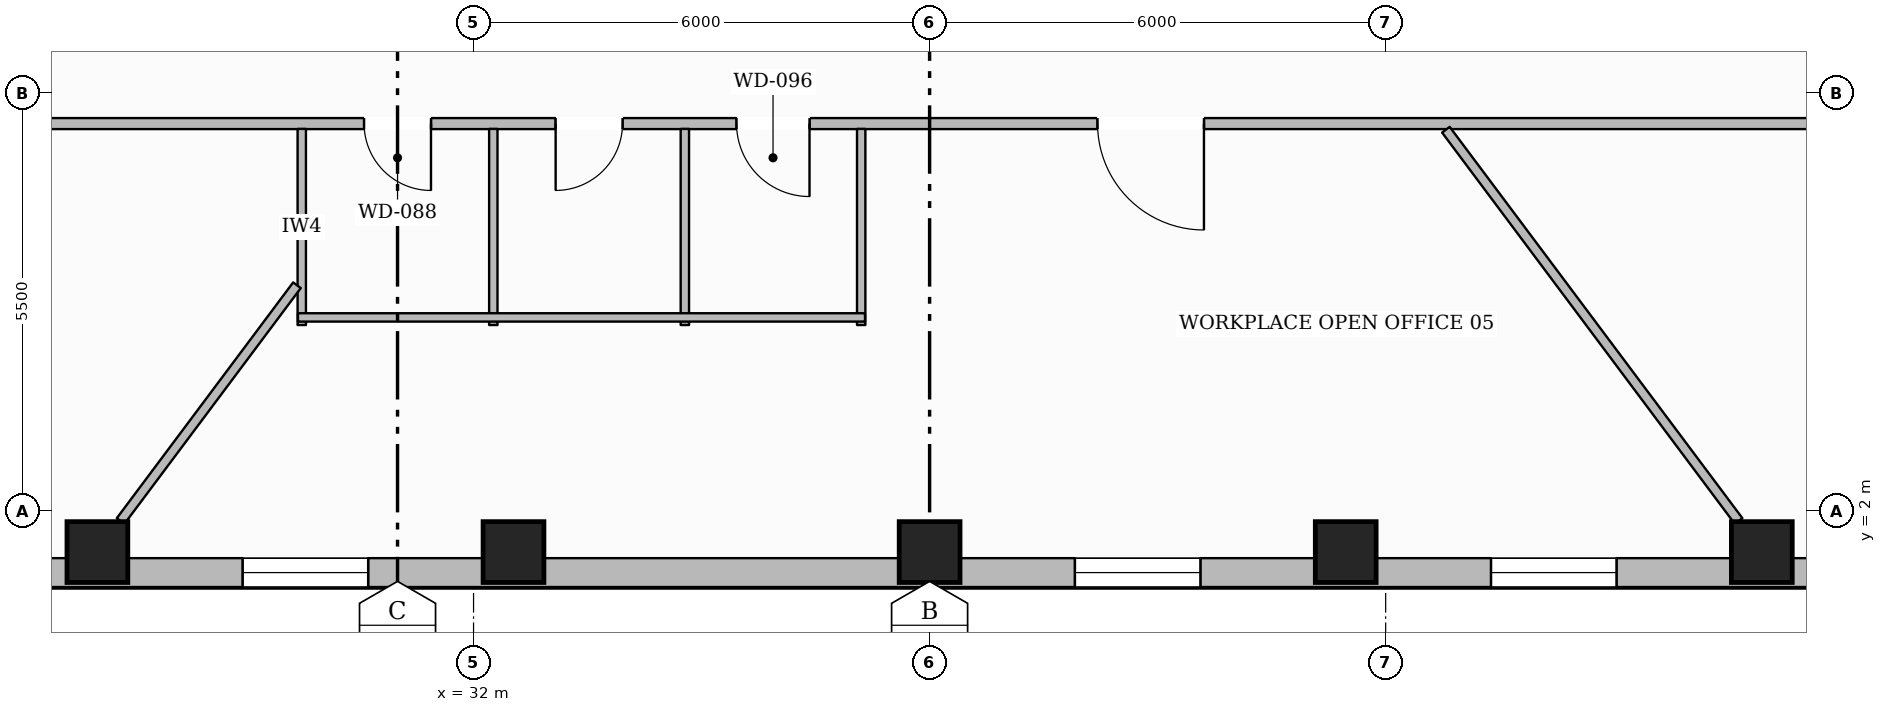
"""IFC4 building model, lengths in metres.
Left out: names, types, materials, properties, quantities, classifications, styles, units other than length and angle.
Written with IfcOpenShell. Run it as: python <this file> out.ifc"""

import sys

from ifc_helpers import new_model, si_unit, direction, frame, frame_2d, origin, origin_2d, place, context, subcontext, project, spatial, rectangle, hollow_rectangle, extrude, element, fill, save


model = new_model("IFC4")
c1 = context("Model", 3, precision=1e-05, world=origin(), true_north=direction((0.0, 1.0)))
c2 = subcontext(c1, "Body", "Model", "MODEL_VIEW")
j1 = project(units=[si_unit("LENGTHUNIT", "METRE"), si_unit("PLANEANGLEUNIT", "RADIAN")], contexts=[c1])
p1 = place(None, origin())
s1 = spatial("IfcSite", under=j1, at=p1, CompositionType="ELEMENT")
p2 = place(p1, origin())
s2 = spatial("IfcBuilding", under=s1, at=p2, CompositionType="ELEMENT")
p3 = place(p2, frame((0.0, 0.0, 21.4)))
s3 = spatial("IfcBuildingStorey", under=s2, at=p3, CompositionType="ELEMENT", Elevation=21.4)
for number, where, z_axis, x_axis in (
    (1, (27.051, 1.463, 0.0), (0.0, 0.0, 1.0), (1.0, 0.0, 0.0)),
    (2, (32.526, 1.463, 0.0), (0.0, 0.0, 1.0), (1.0, 0.0, 0.0)),
    (3, (38.0, 1.463, 0.0), (0.0, 0.0, 1.0), (1.0, 0.0, 0.0)),
    (4, (43.474, 1.463, 0.0), (0.0, 0.0, 1.0), (1.0, 0.0, 0.0)),
    (5, (48.949, 1.463, 0.0), (0.0, 0.0, 1.0), (1.0, 0.0, 0.0)),
):
    element("IfcColumn", number, at=place(p3, frame(where, z_axis=z_axis, x_axis=x_axis)), inside=s3, PredefinedType="COLUMN", context=c2, shape_type="SweptSolid", body=[
        extrude(hollow_rectangle(XDim=0.8, YDim=0.8, WallThickness=0.036, at=origin_2d()), origin(), (0.0, 0.0, 1.0), 3.59),
    ])
p4 = place(p3, frame((54.902, 1.193, 0.0), z_axis=(0.0, 0.0, 1.0), x_axis=(-1.0, 0.0, 0.0)))
e6 = element("IfcWall", 6, at=p4, inside=s3, PredefinedType="STANDARD", context=c2, shape_type="SweptSolid", body=[
    extrude(rectangle(XDim=33.804, YDim=0.38, at=frame_2d((16.902, 0.0))), origin(), (0.0, 0.0, 1.0), 2.97),
])
p5 = place(p4, frame((29.763, 0.0, 0.65)))
e7 = element("IfcOpeningElement", 7, at=p5, cuts=e6, PredefinedType="OPENING", context=c2, shape_type="SweptSolid", body=[
    extrude(rectangle(XDim=1.65, YDim=1.75, at=frame_2d((0.825, 0.875))), frame((0.0, 0.2, 0.0), z_axis=(0.0, -1.0, 0.0), x_axis=(1.0, 0.0, 0.0)), (0.0, 0.0, 1.0), 0.4),
])
p6 = place(p4, frame((24.288, 0.0, 0.65)))
e8 = element("IfcOpeningElement", 8, at=p6, cuts=e6, PredefinedType="OPENING", context=c2, shape_type="SweptSolid", body=[
    extrude(rectangle(XDim=1.65, YDim=1.75, at=frame_2d((0.825, 0.875))), frame((0.0, 0.2, 0.0), z_axis=(0.0, -1.0, 0.0), x_axis=(1.0, 0.0, 0.0)), (0.0, 0.0, 1.0), 0.4),
])
p7 = place(p4, frame((13.34, 0.0, 0.65)))
e9 = element("IfcOpeningElement", 9, at=p7, cuts=e6, PredefinedType="OPENING", context=c2, shape_type="SweptSolid", body=[
    extrude(rectangle(XDim=1.65, YDim=1.75, at=frame_2d((0.825, 0.875))), frame((0.0, 0.2, 0.0), z_axis=(0.0, -1.0, 0.0), x_axis=(1.0, 0.0, 0.0)), (0.0, 0.0, 1.0), 0.4),
])
p8 = place(p4, frame((7.865, 0.0, 0.65)))
e10 = element("IfcOpeningElement", 10, at=p8, cuts=e6, PredefinedType="OPENING", context=c2, shape_type="SweptSolid", body=[
    extrude(rectangle(XDim=1.65, YDim=1.75, at=frame_2d((0.825, 0.875))), frame((0.0, 0.2, 0.0), z_axis=(0.0, -1.0, 0.0), x_axis=(1.0, 0.0, 0.0)), (0.0, 0.0, 1.0), 0.4),
])
p9 = place(p4, frame((2.391, 0.0, 0.65)))
e11 = element("IfcOpeningElement", 11, at=p9, cuts=e6, PredefinedType="OPENING", context=c2, shape_type="SweptSolid", body=[
    extrude(rectangle(XDim=1.65, YDim=1.75, at=frame_2d((0.825, 0.875))), frame((0.0, 0.2, 0.0), z_axis=(0.0, -1.0, 0.0), x_axis=(1.0, 0.0, 0.0)), (0.0, 0.0, 1.0), 0.4),
])
p10 = place(p3, frame((49.92, 7.1, 0.0), z_axis=(0.0, 0.0, 1.0), x_axis=(-1.0, 0.0, 0.0)))
e12 = element("IfcWall", 12, at=p10, inside=s3, PredefinedType="PARTITIONING", context=c2, shape_type="SweptSolid", body=[
    extrude(rectangle(XDim=23.84, YDim=0.145, at=frame_2d((11.92, 0.0))), origin(), (0.0, 0.0, 1.0), 3.278),
])
p11 = place(p10, frame((18.48, 0.0, 0.0)))
e13 = element("IfcOpeningElement", 13, at=p11, cuts=e12, PredefinedType="OPENING", context=c2, shape_type="SweptSolid", body=[
    extrude(rectangle(XDim=0.88, YDim=2.1, at=frame_2d((0.44, 1.05))), frame((0.0, 0.083, 0.0), z_axis=(0.0, -1.0, 0.0), x_axis=(1.0, 0.0, 0.0)), (0.0, 0.0, 1.0), 0.165),
])
p12 = place(p10, frame((15.96, 0.0, 0.0)))
e14 = element("IfcOpeningElement", 14, at=p12, cuts=e12, PredefinedType="OPENING", context=c2, shape_type="SweptSolid", body=[
    extrude(rectangle(XDim=0.88, YDim=2.1, at=frame_2d((0.44, 1.05))), frame((0.0, 0.083, 0.0), z_axis=(0.0, -1.0, 0.0), x_axis=(1.0, 0.0, 0.0)), (0.0, 0.0, 1.0), 0.165),
])
p13 = place(p10, frame((13.5, 0.0, 0.0)))
e15 = element("IfcOpeningElement", 15, at=p13, cuts=e12, PredefinedType="OPENING", context=c2, shape_type="SweptSolid", body=[
    extrude(rectangle(XDim=0.96, YDim=2.1, at=frame_2d((0.48, 1.05))), frame((0.0, 0.083, 0.0), z_axis=(0.0, -1.0, 0.0), x_axis=(1.0, 0.0, 0.0)), (0.0, 0.0, 1.0), 0.165),
])
p14 = place(p10, frame((8.311, 0.0, 0.0)))
e16 = element("IfcOpeningElement", 16, at=p14, cuts=e12, PredefinedType="OPENING", context=c2, shape_type="SweptSolid", body=[
    extrude(rectangle(XDim=1.4, YDim=2.2, at=frame_2d((0.7, 1.1))), frame((0.0, 0.083, 0.0), z_axis=(0.0, -1.0, 0.0), x_axis=(1.0, 0.0, 0.0)), (0.0, 0.0, 1.0), 0.165),
])
for number, where, z_axis, x_axis in (
    (17, (29.74, 4.45, 0.0), (0.0, 0.0, 1.0), (0.0, 1.0, 0.0)),
    (18, (32.26, 4.45, 0.0), (0.0, 0.0, 1.0), (0.0, 1.0, 0.0)),
    (19, (34.78, 4.45, 0.0), (0.0, 0.0, 1.0), (0.0, 1.0, 0.0)),
    (20, (37.1, 4.45, 0.0), (0.0, 0.0, 1.0), (0.0, 1.0, 0.0)),
):
    element("IfcWall", number, at=place(p3, frame(where, z_axis=z_axis, x_axis=x_axis)), inside=s3, PredefinedType="PLUMBINGWALL", context=c2, shape_type="SweptSolid", body=[
        extrude(rectangle(XDim=2.58, YDim=0.11, at=frame_2d((1.29, 0.0))), origin(), (0.0, 0.0, 1.0), 3.59),
    ])
p15 = place(p3, frame((29.69, 4.55, 0.0), z_axis=(0.0, 0.0, 1.0), x_axis=(1.0, 0.0, 0.0)))
e21 = element("IfcWall", 21, at=p15, inside=s3, PredefinedType="PLUMBINGWALL", context=c2, shape_type="SweptSolid", body=[
    extrude(rectangle(XDim=7.46, YDim=0.11, at=frame_2d((3.73, 0.0))), origin(), (0.0, 0.0, 1.0), 3.59),
])
p16 = place(p3, frame((29.677, 4.973, 0.0), z_axis=(0.0, 0.0, 1.0), x_axis=(-0.598981151393, -0.800763123699, 0.0)))
e22 = element("IfcWall", 22, at=p16, inside=s3, PredefinedType="PARTITIONING", context=c2, shape_type="SweptSolid", body=[
    extrude(rectangle(XDim=3.874, YDim=0.125, at=frame_2d((1.937, 0.0))), origin(), (0.0, 0.0, 1.0), 3.59),
])
p17 = place(p3, frame((44.792, 7.02, 0.0), z_axis=(0.0, 0.0, 1.0), x_axis=(0.598984945208, -0.800760285863, 0.0)))
e23 = element("IfcWall", 23, at=p17, inside=s3, PredefinedType="PARTITIONING", context=c2, shape_type="SweptSolid", body=[
    extrude(rectangle(XDim=6.43, YDim=0.125, at=frame_2d((3.215, 0.0))), origin(), (0.0, 0.0, 1.0), 3.59),
])
p18 = place(p6, origin())
e24 = element("IfcWindow", 24, at=p18, inside=s3, PartitioningType="SINGLE_PANEL", PredefinedType="WINDOW", context=c2, shape_type="SweptSolid", body=[
    extrude(rectangle(XDim=1.65, YDim=1.75, at=frame_2d((0.825, 0.875))), frame((0.0, 0.03, 0.0), z_axis=(0.0, -1.0, 0.0), x_axis=(1.0, 0.0, 0.0)), (0.0, 0.0, 1.0), 0.06),
])
fill(e8, e24)
p19 = place(p7, origin())
e25 = element("IfcWindow", 25, at=p19, inside=s3, PartitioningType="SINGLE_PANEL", PredefinedType="WINDOW", context=c2, shape_type="SweptSolid", body=[
    extrude(rectangle(XDim=1.65, YDim=1.75, at=frame_2d((0.825, 0.875))), frame((0.0, 0.03, 0.0), z_axis=(0.0, -1.0, 0.0), x_axis=(1.0, 0.0, 0.0)), (0.0, 0.0, 1.0), 0.06),
])
fill(e9, e25)
p20 = place(p8, origin())
e26 = element("IfcWindow", 26, at=p20, inside=s3, PartitioningType="SINGLE_PANEL", PredefinedType="WINDOW", context=c2, shape_type="SweptSolid", body=[
    extrude(rectangle(XDim=1.65, YDim=1.75, at=frame_2d((0.825, 0.875))), frame((0.0, 0.03, 0.0), z_axis=(0.0, -1.0, 0.0), x_axis=(1.0, 0.0, 0.0)), (0.0, 0.0, 1.0), 0.06),
])
fill(e10, e26)
p21 = place(p11, origin())
e27 = element("IfcDoor", 27, at=p21, inside=s3, OperationType="SINGLE_SWING_LEFT", PredefinedType="DOOR", context=c2, shape_type="SweptSolid", body=[
    extrude(rectangle(XDim=0.88, YDim=2.1, at=frame_2d((0.44, 1.05))), frame((0.0, 0.025, 0.0), z_axis=(0.0, -1.0, 0.0), x_axis=(1.0, 0.0, 0.0)), (0.0, 0.0, 1.0), 0.05),
])
fill(e13, e27)
p22 = place(p12, origin())
e28 = element("IfcDoor", 28, at=p22, inside=s3, OperationType="SINGLE_SWING_RIGHT", PredefinedType="DOOR", context=c2, shape_type="SweptSolid", body=[
    extrude(rectangle(XDim=0.88, YDim=2.1, at=frame_2d((0.44, 1.05))), frame((0.0, 0.025, 0.0), z_axis=(0.0, -1.0, 0.0), x_axis=(1.0, 0.0, 0.0)), (0.0, 0.0, 1.0), 0.05),
])
fill(e14, e28)
p23 = place(p13, origin())
e29 = element("IfcDoor", 29, at=p23, inside=s3, OperationType="SINGLE_SWING_LEFT", PredefinedType="DOOR", context=c2, shape_type="SweptSolid", body=[
    extrude(rectangle(XDim=0.96, YDim=2.1, at=frame_2d((0.48, 1.05))), frame((0.0, 0.025, 0.0), z_axis=(0.0, -1.0, 0.0), x_axis=(1.0, 0.0, 0.0)), (0.0, 0.0, 1.0), 0.05),
])
fill(e15, e29)
p24 = place(p14, origin())
e30 = element("IfcDoor", 30, at=p24, inside=s3, OperationType="SINGLE_SWING_LEFT", PredefinedType="DOOR", context=c2, shape_type="SweptSolid", body=[
    extrude(rectangle(XDim=1.4, YDim=2.2, at=frame_2d((0.7, 1.1))), frame((0.0, 0.025, 0.0), z_axis=(0.0, -1.0, 0.0), x_axis=(1.0, 0.0, 0.0)), (0.0, 0.0, 1.0), 0.05),
])
fill(e16, e30)
save(model, sys.argv[1])
